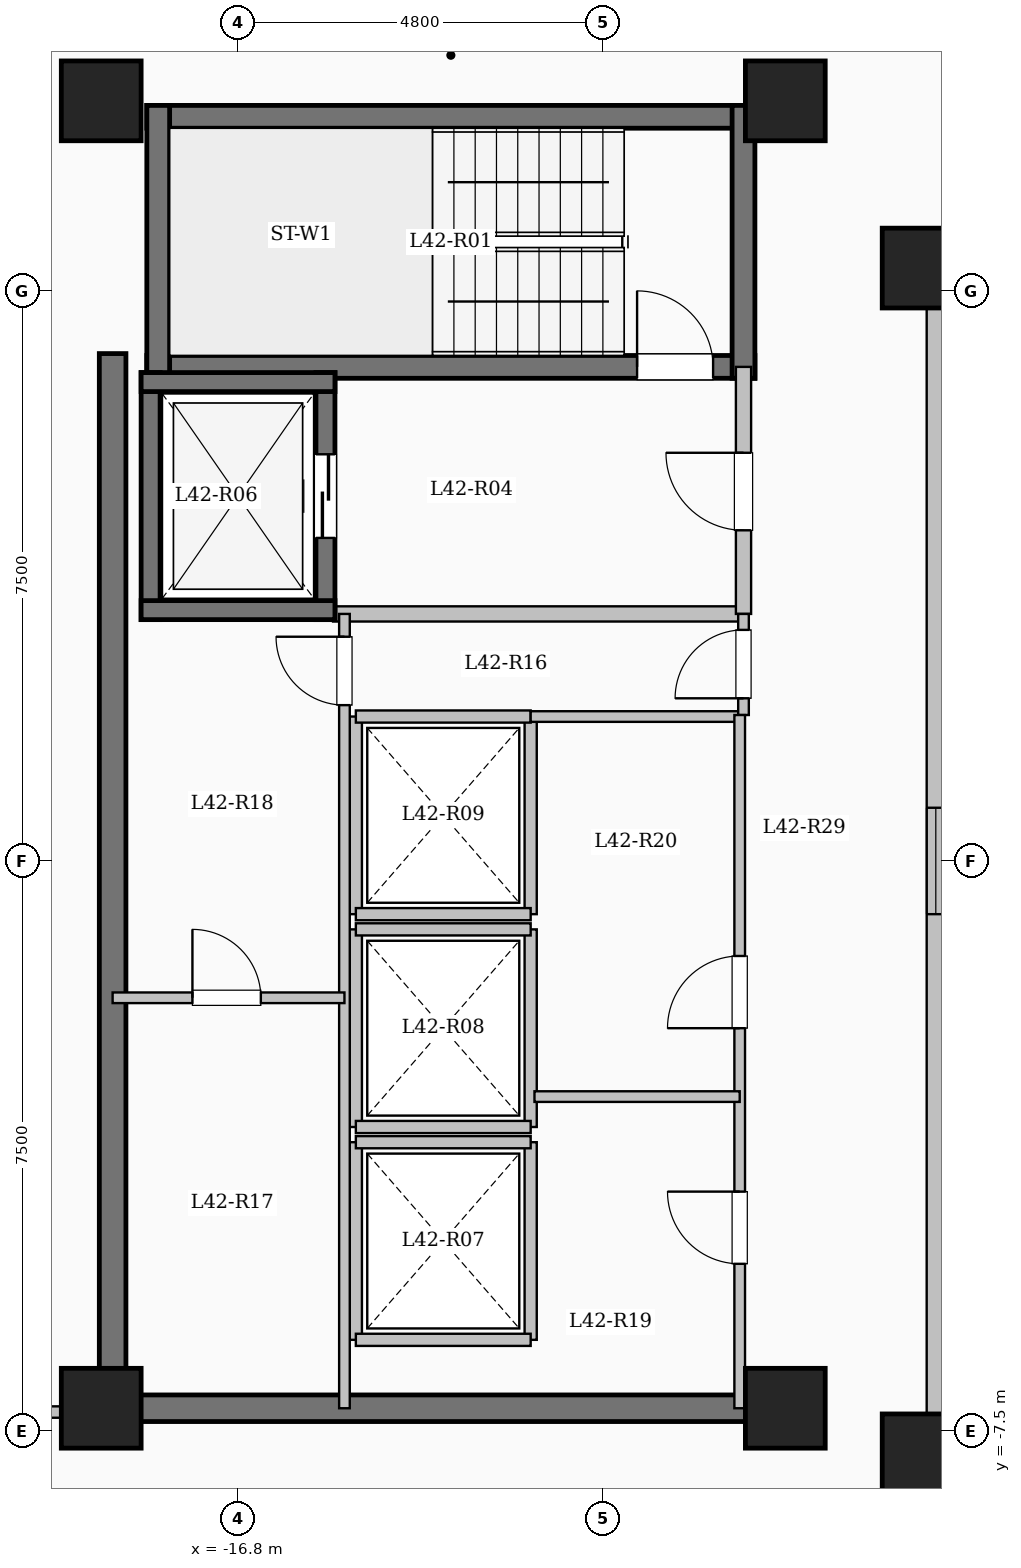
"""IFC4 building model, lengths in metres.
Left out: names, types, materials, properties, quantities, classifications, styles, units other than length and angle.
Written with IfcOpenShell. Run it as: python <this file> out.ifc"""

import sys

from ifc_helpers import new_model, si_unit, direction, frame, frame_2d, origin, origin_2d, place, context, subcontext, project, spatial, rectangle, extrude, element, fill, save


model = new_model("IFC4")
c1 = context("Model", 3, precision=1e-05, world=origin(), true_north=direction((0.0, 1.0)))
c2 = subcontext(c1, "Body", "Model", "MODEL_VIEW")
j1 = project(units=[si_unit("LENGTHUNIT", "METRE"), si_unit("PLANEANGLEUNIT", "RADIAN")], contexts=[c1])
p1 = place(None, origin())
s1 = spatial("IfcSite", under=j1, at=p1, CompositionType="ELEMENT")
p2 = place(p1, origin())
s2 = spatial("IfcBuilding", under=s1, at=p2, CompositionType="ELEMENT")
p3 = place(p2, frame((0.0, 0.0, 156.05)))
s3 = spatial("IfcBuildingStorey", under=s2, at=p3, CompositionType="ELEMENT", Elevation=156.05)
for number, where, z_axis, x_axis in (
    (1, (-7.8, -7.8, 0.0), (0.0, 0.0, 1.0), (1.0, 0.0, 0.0)),
    (2, (-7.8, 7.8, 0.0), (0.0, 0.0, 1.0), (1.0, 0.0, 0.0)),
    (3, (-9.6, -7.2, 0.0), (0.0, 0.0, 1.0), (1.0, 0.0, 0.0)),
    (4, (-9.6, 10.0, 0.0), (0.0, 0.0, 1.0), (1.0, 0.0, 0.0)),
    (5, (-18.6, -7.2, 0.0), (0.0, 0.0, 1.0), (1.0, 0.0, 0.0)),
    (6, (-18.6, 10.0, 0.0), (0.0, 0.0, 1.0), (1.0, 0.0, 0.0)),
):
    element("IfcColumn", number, at=place(p3, frame(where, z_axis=z_axis, x_axis=x_axis)), inside=s3, PredefinedType="COLUMN", context=c2, shape_type="SweptSolid", body=[
        extrude(rectangle(XDim=1.05, YDim=1.05, at=origin_2d()), origin(), (0.0, 0.0, 1.0), 3.35),
    ])
p4 = place(p3, frame((-7.62, -7.62, 0.0), z_axis=(0.0, 0.0, 1.0), x_axis=(1.0, 0.0, 0.0)))
e7 = element("IfcWall", 7, at=p4, inside=s3, PredefinedType="SOLIDWALL", context=c2, shape_type="SweptSolid", body=[
    extrude(rectangle(XDim=15.24, YDim=0.24, at=frame_2d((7.62, 0.0))), origin(), (0.0, 0.0, 1.0), 3.1),
])
p5 = place(p4, frame((6.92, 0.0, 0.95)))
e8 = element("IfcOpeningElement", 8, at=p5, cuts=e7, PredefinedType="OPENING", context=c2, shape_type="SweptSolid", body=[
    extrude(rectangle(XDim=1.4, YDim=1.5, at=frame_2d((0.7, 0.75))), frame((0.0, 0.13, 0.0), z_axis=(0.0, -1.0, 0.0), x_axis=(1.0, 0.0, 0.0)), (0.0, 0.0, 1.0), 0.26),
])
p6 = place(p3, frame((7.62, 7.62, 0.0), z_axis=(0.0, 0.0, 1.0), x_axis=(-1.0, 0.0, 0.0)))
e9 = element("IfcWall", 9, at=p6, inside=s3, PredefinedType="SOLIDWALL", context=c2, shape_type="SweptSolid", body=[
    extrude(rectangle(XDim=15.24, YDim=0.24, at=frame_2d((7.62, 0.0))), origin(), (0.0, 0.0, 1.0), 3.1),
])
p7 = place(p6, frame((6.92, 0.0, 0.95)))
e10 = element("IfcOpeningElement", 10, at=p7, cuts=e9, PredefinedType="OPENING", context=c2, shape_type="SweptSolid", body=[
    extrude(rectangle(XDim=1.4, YDim=1.5, at=frame_2d((0.7, 0.75))), frame((0.0, 0.13, 0.0), z_axis=(0.0, -1.0, 0.0), x_axis=(1.0, 0.0, 0.0)), (0.0, 0.0, 1.0), 0.26),
])
p8 = place(p3, frame((-7.62, 7.62, 0.0), z_axis=(0.0, 0.0, 1.0), x_axis=(0.0, -1.0, 0.0)))
e11 = element("IfcWall", 11, at=p8, inside=s3, PredefinedType="SOLIDWALL", context=c2, shape_type="SweptSolid", body=[
    extrude(rectangle(XDim=15.24, YDim=0.24, at=frame_2d((7.62, 0.0))), origin(), (0.0, 0.0, 1.0), 3.1),
])
p9 = place(p8, frame((6.92, 0.0, 0.95)))
e12 = element("IfcOpeningElement", 12, at=p9, cuts=e11, PredefinedType="OPENING", context=c2, shape_type="SweptSolid", body=[
    extrude(rectangle(XDim=1.4, YDim=1.5, at=frame_2d((0.7, 0.75))), frame((0.0, 0.13, 0.0), z_axis=(0.0, -1.0, 0.0), x_axis=(1.0, 0.0, 0.0)), (0.0, 0.0, 1.0), 0.26),
])
p10 = place(p3, frame((-18.0, 9.79, 0.0), z_axis=(0.0, 0.0, 1.0), x_axis=(1.0, 0.0, 0.0)))
e13 = element("IfcWall", 13, at=p10, inside=s3, PredefinedType="SHEAR", context=c2, shape_type="SweptSolid", body=[
    extrude(rectangle(XDim=8.0, YDim=0.3, at=frame_2d((4.0, 0.0))), origin(), (0.0, 0.0, 1.0), 3.35),
])
p11 = place(p3, frame((-18.0, 6.5, 0.0), z_axis=(0.0, 0.0, 1.0), x_axis=(1.0, 0.0, 0.0)))
e14 = element("IfcWall", 14, at=p11, inside=s3, PredefinedType="SHEAR", context=c2, shape_type="SweptSolid", body=[
    extrude(rectangle(XDim=8.0, YDim=0.3, at=frame_2d((4.0, 0.0))), origin(), (0.0, 0.0, 1.0), 3.35),
])
p12 = place(p11, frame((6.45, 0.0, 0.0)))
e15 = element("IfcOpeningElement", 15, at=p12, cuts=e14, PredefinedType="OPENING", context=c2, shape_type="SweptSolid", body=[
    extrude(rectangle(XDim=1.0, YDim=2.15, at=frame_2d((0.5, 1.075))), frame((0.0, 0.16, 0.0), z_axis=(0.0, -1.0, 0.0), x_axis=(1.0, 0.0, 0.0)), (0.0, 0.0, 1.0), 0.32),
])
for number, where, z_axis, x_axis in (
    (16, (-17.85, 6.35, 0.0), (0.0, 0.0, 1.0), (0.0, 1.0, 0.0)),
    (17, (-10.15, 6.35, 0.0), (0.0, 0.0, 1.0), (0.0, 1.0, 0.0)),
):
    element("IfcWall", number, at=place(p3, frame(where, z_axis=z_axis, x_axis=x_axis)), inside=s3, PredefinedType="SHEAR", context=c2, shape_type="SweptSolid", body=[
        extrude(rectangle(XDim=3.59, YDim=0.3, at=frame_2d((1.795, 0.0))), origin(), (0.0, 0.0, 1.0), 3.35),
    ])
p13 = place(p3, frame((-15.55, 3.25, 0.0), z_axis=(0.0, 0.0, 1.0), x_axis=(1.0, 0.0, 0.0)))
e18 = element("IfcWall", 18, at=p13, inside=s3, PredefinedType="SOLIDWALL", context=c2, shape_type="SweptSolid", body=[
    extrude(rectangle(XDim=5.4, YDim=0.2, at=frame_2d((2.7, 0.0))), origin(), (0.0, 0.0, 1.0), 3.1),
])
p14 = place(p3, frame((-10.15, 3.25, 0.0), z_axis=(0.0, 0.0, 1.0), x_axis=(0.0, 1.0, 0.0)))
e19 = element("IfcWall", 19, at=p14, inside=s3, PredefinedType="SOLIDWALL", context=c2, shape_type="SweptSolid", body=[
    extrude(rectangle(XDim=3.25, YDim=0.2, at=frame_2d((1.625, 0.0))), origin(), (0.0, 0.0, 1.0), 3.1),
])
p15 = place(p14, frame((1.1, 0.0, 0.0)))
e20 = element("IfcOpeningElement", 20, at=p15, cuts=e19, PredefinedType="OPENING", context=c2, shape_type="SweptSolid", body=[
    extrude(rectangle(XDim=1.02, YDim=2.15, at=frame_2d((0.51, 1.075))), frame((0.0, 0.11, 0.0), z_axis=(0.0, -1.0, 0.0), x_axis=(1.0, 0.0, 0.0)), (0.0, 0.0, 1.0), 0.22),
])
p16 = place(p3, frame((-17.95, 3.175, 0.0), z_axis=(0.0, 0.0, 1.0), x_axis=(0.0, 1.0, 0.0)))
e21 = element("IfcWall", 21, at=p16, inside=s3, PredefinedType="SHEAR", context=c2, shape_type="SweptSolid", body=[
    extrude(rectangle(XDim=3.25, YDim=0.25, at=frame_2d((1.625, 0.0))), origin(), (0.0, 0.0, 1.0), 3.35),
])
p17 = place(p3, frame((-15.65, 3.175, 0.0), z_axis=(0.0, 0.0, 1.0), x_axis=(0.0, 1.0, 0.0)))
e22 = element("IfcWall", 22, at=p17, inside=s3, PredefinedType="SHEAR", context=c2, shape_type="SweptSolid", body=[
    extrude(rectangle(XDim=3.25, YDim=0.25, at=frame_2d((1.625, 0.0))), origin(), (0.0, 0.0, 1.0), 3.35),
])
p18 = place(p17, frame((1.075, 0.0, 0.0)))
e23 = element("IfcOpeningElement", 23, at=p18, cuts=e22, PredefinedType="OPENING", context=c2, shape_type="SweptSolid", body=[
    extrude(rectangle(XDim=1.1, YDim=2.15, at=frame_2d((0.55, 1.075))), frame((0.0, 0.135, 0.0), z_axis=(0.0, -1.0, 0.0), x_axis=(1.0, 0.0, 0.0)), (0.0, 0.0, 1.0), 0.27),
])
for number, where, z_axis, x_axis in (
    (24, (-18.075, 3.3, 0.0), (0.0, 0.0, 1.0), (1.0, 0.0, 0.0)),
    (25, (-18.075, 6.3, 0.0), (0.0, 0.0, 1.0), (1.0, 0.0, 0.0)),
):
    element("IfcWall", number, at=place(p3, frame(where, z_axis=z_axis, x_axis=x_axis)), inside=s3, PredefinedType="SHEAR", context=c2, shape_type="SweptSolid", body=[
        extrude(rectangle(XDim=2.55, YDim=0.25, at=frame_2d((1.275, 0.0))), origin(), (0.0, 0.0, 1.0), 3.35),
    ])
for number, where, z_axis, x_axis in (
    (26, (-15.25, -6.3, 0.0), (0.0, 0.0, 1.0), (0.0, 1.0, 0.0)),
    (27, (-12.95, -6.3, 0.0), (0.0, 0.0, 1.0), (0.0, 1.0, 0.0)),
):
    element("IfcWall", number, at=place(p3, frame(where, z_axis=z_axis, x_axis=x_axis)), inside=s3, PredefinedType="SOLIDWALL", context=c2, shape_type="SweptSolid", body=[
        extrude(rectangle(XDim=2.6, YDim=0.16, at=frame_2d((1.3, 0.0))), origin(), (0.0, 0.0, 1.0), 3.1),
    ])
for number, where, z_axis, x_axis in (
    (28, (-15.25, -6.3, 0.0), (0.0, 0.0, 1.0), (1.0, 0.0, 0.0)),
    (29, (-15.25, -3.7, 0.0), (0.0, 0.0, 1.0), (1.0, 0.0, 0.0)),
):
    element("IfcWall", number, at=place(p3, frame(where, z_axis=z_axis, x_axis=x_axis)), inside=s3, PredefinedType="SOLIDWALL", context=c2, shape_type="SweptSolid", body=[
        extrude(rectangle(XDim=2.3, YDim=0.16, at=frame_2d((1.15, 0.0))), origin(), (0.0, 0.0, 1.0), 3.1),
    ])
for number, where, z_axis, x_axis in (
    (30, (-15.25, -3.5, 0.0), (0.0, 0.0, 1.0), (0.0, 1.0, 0.0)),
    (31, (-12.95, -3.5, 0.0), (0.0, 0.0, 1.0), (0.0, 1.0, 0.0)),
):
    element("IfcWall", number, at=place(p3, frame(where, z_axis=z_axis, x_axis=x_axis)), inside=s3, PredefinedType="SOLIDWALL", context=c2, shape_type="SweptSolid", body=[
        extrude(rectangle(XDim=2.6, YDim=0.16, at=frame_2d((1.3, 0.0))), origin(), (0.0, 0.0, 1.0), 3.1),
    ])
for number, where, z_axis, x_axis in (
    (32, (-15.25, -3.5, 0.0), (0.0, 0.0, 1.0), (1.0, 0.0, 0.0)),
    (33, (-15.25, -0.9, 0.0), (0.0, 0.0, 1.0), (1.0, 0.0, 0.0)),
):
    element("IfcWall", number, at=place(p3, frame(where, z_axis=z_axis, x_axis=x_axis)), inside=s3, PredefinedType="SOLIDWALL", context=c2, shape_type="SweptSolid", body=[
        extrude(rectangle(XDim=2.3, YDim=0.16, at=frame_2d((1.15, 0.0))), origin(), (0.0, 0.0, 1.0), 3.1),
    ])
for number, where, z_axis, x_axis in (
    (34, (-15.25, -0.7, 0.0), (0.0, 0.0, 1.0), (0.0, 1.0, 0.0)),
    (35, (-12.95, -0.7, 0.0), (0.0, 0.0, 1.0), (0.0, 1.0, 0.0)),
):
    element("IfcWall", number, at=place(p3, frame(where, z_axis=z_axis, x_axis=x_axis)), inside=s3, PredefinedType="SOLIDWALL", context=c2, shape_type="SweptSolid", body=[
        extrude(rectangle(XDim=2.6, YDim=0.16, at=frame_2d((1.3, 0.0))), origin(), (0.0, 0.0, 1.0), 3.1),
    ])
for number, where, z_axis, x_axis in (
    (36, (-15.25, -0.7, 0.0), (0.0, 0.0, 1.0), (1.0, 0.0, 0.0)),
    (37, (-15.25, 1.9, 0.0), (0.0, 0.0, 1.0), (1.0, 0.0, 0.0)),
):
    element("IfcWall", number, at=place(p3, frame(where, z_axis=z_axis, x_axis=x_axis)), inside=s3, PredefinedType="SOLIDWALL", context=c2, shape_type="SweptSolid", body=[
        extrude(rectangle(XDim=2.3, YDim=0.16, at=frame_2d((1.15, 0.0))), origin(), (0.0, 0.0, 1.0), 3.1),
    ])
p19 = place(p3, frame((-18.45, -7.375, 0.0), z_axis=(0.0, 0.0, 1.0), x_axis=(0.0, 1.0, 0.0)))
e38 = element("IfcWall", 38, at=p19, inside=s3, PredefinedType="SHEAR", context=c2, shape_type="SweptSolid", body=[
    extrude(rectangle(XDim=14.05, YDim=0.35, at=frame_2d((7.025, 0.0))), origin(), (0.0, 0.0, 1.0), 3.35),
])
p20 = place(p3, frame((-18.625, -7.2, 0.0), z_axis=(0.0, 0.0, 1.0), x_axis=(1.0, 0.0, 0.0)))
e39 = element("IfcWall", 39, at=p20, inside=s3, PredefinedType="SHEAR", context=c2, shape_type="SweptSolid", body=[
    extrude(rectangle(XDim=8.55, YDim=0.35, at=frame_2d((4.275, 0.0))), origin(), (0.0, 0.0, 1.0), 3.35),
])
p21 = place(p3, frame((-12.95, 1.9, 0.0), z_axis=(0.0, 0.0, 1.0), x_axis=(1.0, 0.0, 0.0)))
e40 = element("IfcWall", 40, at=p21, inside=s3, PredefinedType="PARTITIONING", context=c2, shape_type="SweptSolid", body=[
    extrude(rectangle(XDim=2.8, YDim=0.14, at=frame_2d((1.4, 0.0))), origin(), (0.0, 0.0, 1.0), 3.1),
])
p22 = place(p3, frame((-10.15, 1.92, 0.0), z_axis=(0.0, 0.0, 1.0), x_axis=(0.0, 1.0, 0.0)))
e41 = element("IfcWall", 41, at=p22, inside=s3, PredefinedType="PARTITIONING", context=c2, shape_type="SweptSolid", body=[
    extrude(rectangle(XDim=1.33, YDim=0.14, at=frame_2d((0.665, 0.0))), origin(), (0.0, 0.0, 1.0), 3.1),
])
p23 = place(p22, frame((0.22, 0.0, 0.0)))
e42 = element("IfcOpeningElement", 42, at=p23, cuts=e41, PredefinedType="OPENING", context=c2, shape_type="SweptSolid", body=[
    extrude(rectangle(XDim=0.9, YDim=2.08, at=frame_2d((0.45, 1.04))), frame((0.0, 0.08, 0.0), z_axis=(0.0, -1.0, 0.0), x_axis=(1.0, 0.0, 0.0)), (0.0, 0.0, 1.0), 0.16),
])
p24 = place(p3, frame((-15.4, -7.2, 0.0), z_axis=(0.0, 0.0, 1.0), x_axis=(0.0, 1.0, 0.0)))
e43 = element("IfcWall", 43, at=p24, inside=s3, PredefinedType="PARTITIONING", context=c2, shape_type="SweptSolid", body=[
    extrude(rectangle(XDim=10.45, YDim=0.14, at=frame_2d((5.225, 0.0))), origin(), (0.0, 0.0, 1.0), 3.1),
])
p25 = place(p24, frame((9.25, 0.0, 0.0)))
e44 = element("IfcOpeningElement", 44, at=p25, cuts=e43, PredefinedType="OPENING", context=c2, shape_type="SweptSolid", body=[
    extrude(rectangle(XDim=0.9, YDim=2.08, at=frame_2d((0.45, 1.04))), frame((0.0, 0.08, 0.0), z_axis=(0.0, -1.0, 0.0), x_axis=(1.0, 0.0, 0.0)), (0.0, 0.0, 1.0), 0.16),
])
p26 = place(p3, frame((-18.45, -1.8, 0.0), z_axis=(0.0, 0.0, 1.0), x_axis=(1.0, 0.0, 0.0)))
e45 = element("IfcWall", 45, at=p26, inside=s3, PredefinedType="PARTITIONING", context=c2, shape_type="SweptSolid", body=[
    extrude(rectangle(XDim=3.05, YDim=0.14, at=frame_2d((1.525, 0.0))), origin(), (0.0, 0.0, 1.0), 3.1),
])
p27 = place(p26, frame((1.05, 0.0, 0.0)))
e46 = element("IfcOpeningElement", 46, at=p27, cuts=e45, PredefinedType="OPENING", context=c2, shape_type="SweptSolid", body=[
    extrude(rectangle(XDim=0.9, YDim=2.08, at=frame_2d((0.45, 1.04))), frame((0.0, 0.08, 0.0), z_axis=(0.0, -1.0, 0.0), x_axis=(1.0, 0.0, 0.0)), (0.0, 0.0, 1.0), 0.16),
])
p28 = place(p3, frame((-10.2, -7.2, 0.0), z_axis=(0.0, 0.0, 1.0), x_axis=(0.0, 1.0, 0.0)))
e47 = element("IfcWall", 47, at=p28, inside=s3, PredefinedType="PARTITIONING", context=c2, shape_type="SweptSolid", body=[
    extrude(rectangle(XDim=9.12, YDim=0.14, at=frame_2d((4.56, 0.0))), origin(), (0.0, 0.0, 1.0), 3.1),
])
p29 = place(p28, frame((1.9, 0.0, 0.0)))
e48 = element("IfcOpeningElement", 48, at=p29, cuts=e47, PredefinedType="OPENING", context=c2, shape_type="SweptSolid", body=[
    extrude(rectangle(XDim=0.95, YDim=2.12, at=frame_2d((0.475, 1.06))), frame((0.0, 0.08, 0.0), z_axis=(0.0, -1.0, 0.0), x_axis=(1.0, 0.0, 0.0)), (0.0, 0.0, 1.0), 0.16),
])
p30 = place(p28, frame((5.0, 0.0, 0.0)))
e49 = element("IfcOpeningElement", 49, at=p30, cuts=e47, PredefinedType="OPENING", context=c2, shape_type="SweptSolid", body=[
    extrude(rectangle(XDim=0.95, YDim=2.12, at=frame_2d((0.475, 1.06))), frame((0.0, 0.08, 0.0), z_axis=(0.0, -1.0, 0.0), x_axis=(1.0, 0.0, 0.0)), (0.0, 0.0, 1.0), 0.16),
])
p31 = place(p3, frame((-12.9, -3.1, 0.0), z_axis=(0.0, 0.0, 1.0), x_axis=(1.0, 0.0, 0.0)))
e50 = element("IfcWall", 50, at=p31, inside=s3, PredefinedType="PARTITIONING", context=c2, shape_type="SweptSolid", body=[
    extrude(rectangle(XDim=2.7, YDim=0.14, at=frame_2d((1.35, 0.0))), origin(), (0.0, 0.0, 1.0), 3.1),
])
p32 = place(p3, frame((-25.08, -7.25, 0.0), z_axis=(0.0, 0.0, 1.0), x_axis=(1.0, 0.0, 0.0)))
e51 = element("IfcWall", 51, at=p32, inside=s3, PredefinedType="PARTITIONING", context=c2, shape_type="SweptSolid", body=[
    extrude(rectangle(XDim=6.63, YDim=0.15, at=frame_2d((3.315, 0.0))), origin(), (0.0, 0.0, 1.0), 3.1),
])
p33 = place(p32, frame((3.58, 0.0, 0.0)))
e52 = element("IfcOpeningElement", 52, at=p33, cuts=e51, PredefinedType="OPENING", context=c2, shape_type="SweptSolid", body=[
    extrude(rectangle(XDim=1.08, YDim=2.15, at=frame_2d((0.54, 1.075))), frame((0.0, 0.085, 0.0), z_axis=(0.0, -1.0, 0.0), x_axis=(1.0, 0.0, 0.0)), (0.0, 0.0, 1.0), 0.17),
])
p34 = place(p9, origin())
e53 = element("IfcWindow", 53, at=p34, inside=s3, PartitioningType="SINGLE_PANEL", PredefinedType="WINDOW", context=c2, shape_type="SweptSolid", body=[
    extrude(rectangle(XDim=1.4, YDim=1.5, at=frame_2d((0.7, 0.75))), frame((0.0, 0.03, 0.0), z_axis=(0.0, -1.0, 0.0), x_axis=(1.0, 0.0, 0.0)), (0.0, 0.0, 1.0), 0.06),
])
fill(e12, e53)
p35 = place(p12, origin())
e54 = element("IfcDoor", 54, at=p35, inside=s3, OperationType="SINGLE_SWING_LEFT", PredefinedType="DOOR", context=c2, shape_type="SweptSolid", body=[
    extrude(rectangle(XDim=1.0, YDim=2.15, at=frame_2d((0.5, 1.075))), frame((0.0, 0.025, 0.0), z_axis=(0.0, -1.0, 0.0), x_axis=(1.0, 0.0, 0.0)), (0.0, 0.0, 1.0), 0.05),
])
fill(e15, e54)
p36 = place(p15, origin())
e55 = element("IfcDoor", 55, at=p36, inside=s3, OperationType="SINGLE_SWING_RIGHT", PredefinedType="DOOR", context=c2, shape_type="SweptSolid", body=[
    extrude(rectangle(XDim=1.02, YDim=2.15, at=frame_2d((0.51, 1.075))), frame((0.0, 0.025, 0.0), z_axis=(0.0, -1.0, 0.0), x_axis=(1.0, 0.0, 0.0)), (0.0, 0.0, 1.0), 0.05),
])
fill(e20, e55)
p37 = place(p18, origin())
e56 = element("IfcDoor", 56, at=p37, inside=s3, OperationType="SLIDING_TO_LEFT", PredefinedType="DOOR", context=c2, shape_type="SweptSolid", body=[
    extrude(rectangle(XDim=1.1, YDim=2.15, at=frame_2d((0.55, 1.075))), frame((0.0, 0.025, 0.0), z_axis=(0.0, -1.0, 0.0), x_axis=(1.0, 0.0, 0.0)), (0.0, 0.0, 1.0), 0.05),
])
fill(e23, e56)
p38 = place(p23, origin())
e57 = element("IfcDoor", 57, at=p38, inside=s3, OperationType="SINGLE_SWING_LEFT", PredefinedType="DOOR", context=c2, shape_type="SweptSolid", body=[
    extrude(rectangle(XDim=0.9, YDim=2.08, at=frame_2d((0.45, 1.04))), frame((0.0, 0.025, 0.0), z_axis=(0.0, -1.0, 0.0), x_axis=(1.0, 0.0, 0.0)), (0.0, 0.0, 1.0), 0.05),
])
fill(e42, e57)
p39 = place(p25, origin())
e58 = element("IfcDoor", 58, at=p39, inside=s3, OperationType="SINGLE_SWING_RIGHT", PredefinedType="DOOR", context=c2, shape_type="SweptSolid", body=[
    extrude(rectangle(XDim=0.9, YDim=2.08, at=frame_2d((0.45, 1.04))), frame((0.0, 0.025, 0.0), z_axis=(0.0, -1.0, 0.0), x_axis=(1.0, 0.0, 0.0)), (0.0, 0.0, 1.0), 0.05),
])
fill(e44, e58)
p40 = place(p27, origin())
e59 = element("IfcDoor", 59, at=p40, inside=s3, OperationType="SINGLE_SWING_LEFT", PredefinedType="DOOR", context=c2, shape_type="SweptSolid", body=[
    extrude(rectangle(XDim=0.9, YDim=2.08, at=frame_2d((0.45, 1.04))), frame((0.0, 0.025, 0.0), z_axis=(0.0, -1.0, 0.0), x_axis=(1.0, 0.0, 0.0)), (0.0, 0.0, 1.0), 0.05),
])
fill(e46, e59)
p41 = place(p29, origin())
e60 = element("IfcDoor", 60, at=p41, inside=s3, OperationType="SINGLE_SWING_RIGHT", PredefinedType="DOOR", context=c2, shape_type="SweptSolid", body=[
    extrude(rectangle(XDim=0.95, YDim=2.12, at=frame_2d((0.475, 1.06))), frame((0.0, 0.025, 0.0), z_axis=(0.0, -1.0, 0.0), x_axis=(1.0, 0.0, 0.0)), (0.0, 0.0, 1.0), 0.05),
])
fill(e48, e60)
p42 = place(p30, origin())
e61 = element("IfcDoor", 61, at=p42, inside=s3, OperationType="SINGLE_SWING_LEFT", PredefinedType="DOOR", context=c2, shape_type="SweptSolid", body=[
    extrude(rectangle(XDim=0.95, YDim=2.12, at=frame_2d((0.475, 1.06))), frame((0.0, 0.025, 0.0), z_axis=(0.0, -1.0, 0.0), x_axis=(1.0, 0.0, 0.0)), (0.0, 0.0, 1.0), 0.05),
])
fill(e49, e61)
save(model, sys.argv[1])
